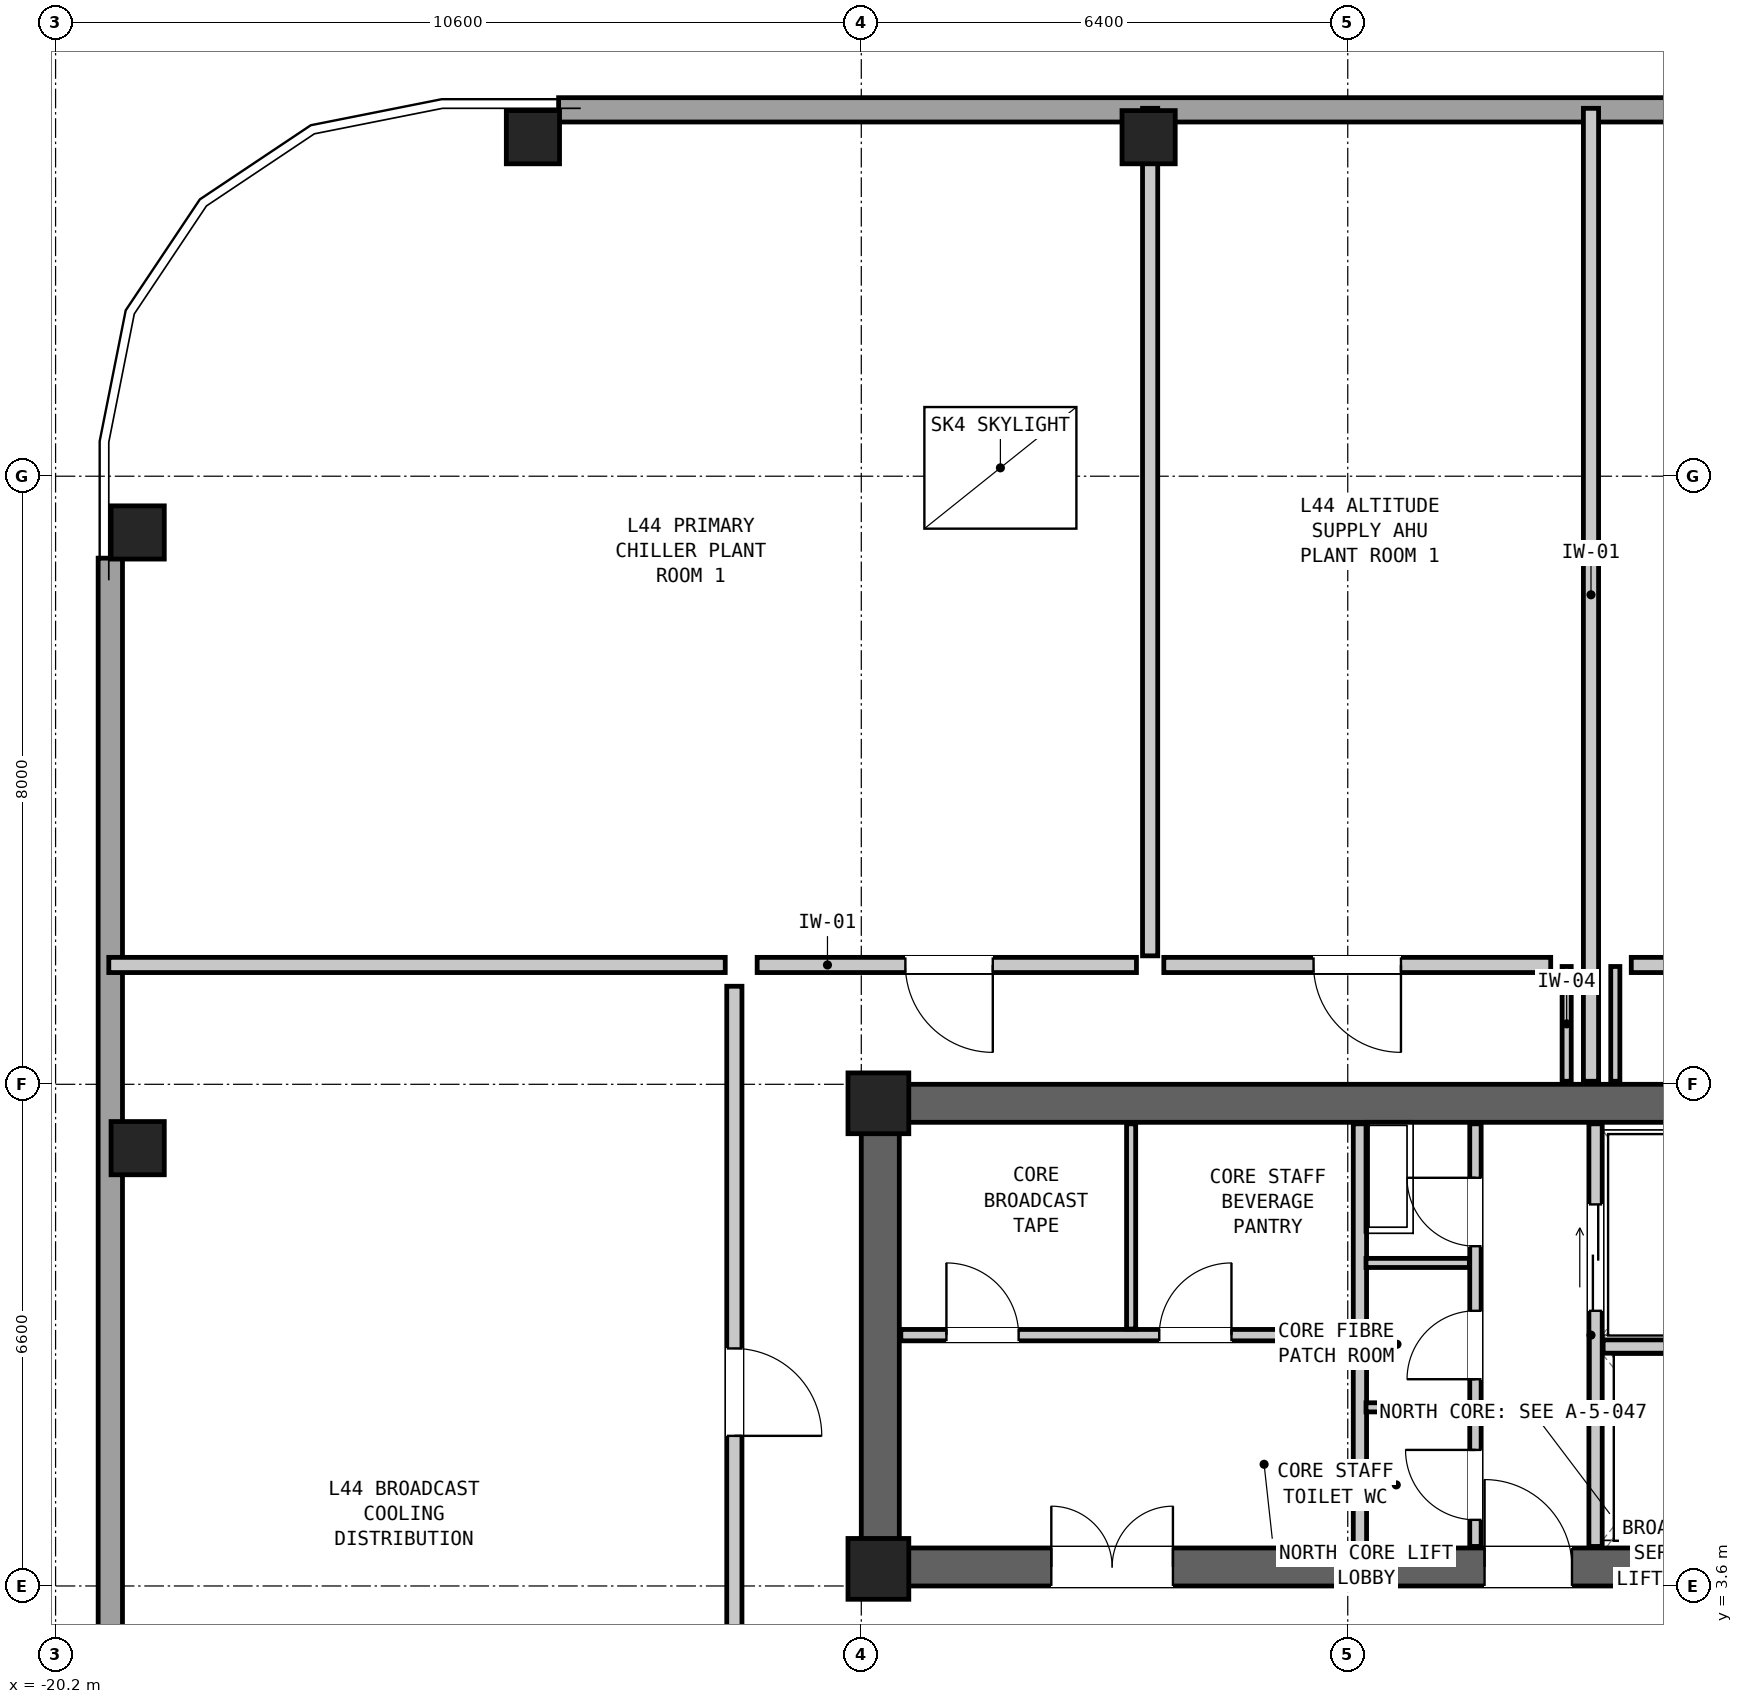
"""IFC4 building model, lengths in metres.
Left out: names, types, materials, properties, quantities, classifications, styles, units other than length and angle.
Written with IfcOpenShell. Run it as: python <this file> out.ifc"""

import sys

from ifc_helpers import new_model, si_unit, direction, frame, frame_2d, origin, origin_2d, place, context, subcontext, project, spatial, rectangle, hollow_rectangle, extrude, element, fill, save


model = new_model("IFC4")
c1 = context("Model", 3, precision=1e-05, world=origin(), true_north=direction((0.0, 1.0)))
c2 = subcontext(c1, "Body", "Model", "MODEL_VIEW")
j1 = project(units=[si_unit("LENGTHUNIT", "METRE"), si_unit("PLANEANGLEUNIT", "RADIAN")], contexts=[c1])
p1 = place(None, origin())
s1 = spatial("IfcSite", under=j1, at=p1, CompositionType="ELEMENT")
p2 = place(p1, origin())
s2 = spatial("IfcBuilding", under=s1, at=p2, CompositionType="ELEMENT")
p3 = place(p2, frame((0.0, 0.0, 151.8)))
s3 = spatial("IfcBuildingStorey", under=s2, at=p3, CompositionType="ELEMENT", Elevation=151.8)
p4 = place(p3, frame((-9.6, 9.95, 0.0), z_axis=(0.0, 0.0, 1.0), x_axis=(1.0, 0.0, 0.0)))
e1 = element("IfcWall", 1, at=p4, inside=s3, PredefinedType="SHEAR", context=c2, shape_type="SweptSolid", body=[
    extrude(rectangle(XDim=19.2, YDim=0.5, at=frame_2d((9.6, 0.0))), origin(), (0.0, 0.0, 1.0), 4.35),
])
p5 = place(p3, frame((-9.6, 3.85, 0.0), z_axis=(0.0, 0.0, 1.0), x_axis=(1.0, 0.0, 0.0)))
e2 = element("IfcWall", 2, at=p5, inside=s3, PredefinedType="SHEAR", context=c2, shape_type="SweptSolid", body=[
    extrude(rectangle(XDim=19.2, YDim=0.5, at=frame_2d((9.6, 0.0))), origin(), (0.0, 0.0, 1.0), 4.35),
])
p6 = place(p5, frame((14.2, 0.0, 0.0)))
e3 = element("IfcOpeningElement", 3, at=p6, cuts=e2, PredefinedType="OPENING", context=c2, shape_type="SweptSolid", body=[
    extrude(rectangle(XDim=1.1, YDim=2.08, at=frame_2d((0.55, 1.04))), frame((0.0, 0.262, 0.0), z_axis=(0.0, -1.0, 0.0), x_axis=(1.0, 0.0, 0.0)), (0.0, 0.0, 1.0), 0.524),
])
p7 = place(p5, frame((8.2, 0.0, 0.0)))
e4 = element("IfcOpeningElement", 4, at=p7, cuts=e2, PredefinedType="OPENING", context=c2, shape_type="SweptSolid", body=[
    extrude(rectangle(XDim=1.15, YDim=2.1, at=frame_2d((0.575, 1.05))), frame((0.0, 0.262, 0.0), z_axis=(0.0, -1.0, 0.0), x_axis=(1.0, 0.0, 0.0)), (0.0, 0.0, 1.0), 0.524),
])
p8 = place(p5, frame((2.5, 0.0, 0.0)))
e5 = element("IfcOpeningElement", 5, at=p8, cuts=e2, PredefinedType="OPENING", context=c2, shape_type="SweptSolid", body=[
    extrude(rectangle(XDim=1.6, YDim=2.12, at=frame_2d((0.8, 1.06))), frame((0.0, 0.262, 0.0), z_axis=(0.0, -1.0, 0.0), x_axis=(1.0, 0.0, 0.0)), (0.0, 0.0, 1.0), 0.524),
])
p9 = place(p3, frame((-9.35, 3.6, 0.0), z_axis=(0.0, 0.0, 1.0), x_axis=(0.0, 1.0, 0.0)))
e6 = element("IfcWall", 6, at=p9, inside=s3, PredefinedType="SHEAR", context=c2, shape_type="SweptSolid", body=[
    extrude(rectangle(XDim=6.6, YDim=0.5, at=frame_2d((3.3, 0.0))), origin(), (0.0, 0.0, 1.0), 4.35),
])
for number, where, z_axis, x_axis in (
    (7, (-5.82, 22.66, 0.0), (0.0, 0.0, 1.0), (1.0, 0.0, 0.0)),
    (8, (-13.92, 22.66, 0.0), (0.0, 0.0, 1.0), (1.0, 0.0, 0.0)),
    (9, (-19.12, 17.46, 0.0), (0.0, 0.0, 1.0), (0.0, 1.0, 0.0)),
    (10, (-19.12, 9.36, 0.0), (0.0, 0.0, 1.0), (0.0, 1.0, 0.0)),
):
    element("IfcColumn", number, at=place(p3, frame(where, z_axis=z_axis, x_axis=x_axis)), inside=s3, PredefinedType="COLUMN", context=c2, shape_type="SweptSolid", body=[
        extrude(hollow_rectangle(XDim=0.7, YDim=0.7, WallThickness=0.045, at=origin_2d()), origin(), (0.0, 0.0, 1.0), 4.35),
    ])
for number, where, z_axis, x_axis in (
    (11, (-9.375, 9.95, 0.0), (0.0, 0.0, 1.0), (1.0, 0.0, 0.0)),
    (12, (-9.375, 3.825, 0.0), (0.0, 0.0, 1.0), (1.0, 0.0, 0.0)),
):
    element("IfcColumn", number, at=place(p3, frame(where, z_axis=z_axis, x_axis=x_axis)), inside=s3, PredefinedType="COLUMN", context=c2, shape_type="SweptSolid", body=[
        extrude(rectangle(XDim=0.8, YDim=0.8, at=origin_2d()), origin(), (0.0, 0.0, 1.0), 4.35),
    ])
p10 = place(p3, frame((-13.582, 23.02, 0.0), z_axis=(0.0, 0.0, 1.0), x_axis=(1.0, 0.0, 0.0)))
e13 = element("IfcWall", 13, at=p10, inside=s3, PredefinedType="SOLIDWALL", context=c2, shape_type="SweptSolid", body=[
    extrude(rectangle(XDim=23.624, YDim=0.32, at=frame_2d((11.812, 0.0))), origin(), (0.0, 0.0, 1.0), 2.11),
])
p11 = place(p3, frame((-19.48, -6.502, 0.0), z_axis=(0.0, 0.0, 1.0), x_axis=(0.0, 1.0, 0.0)))
e14 = element("IfcWall", 14, at=p11, inside=s3, PredefinedType="SOLIDWALL", context=c2, shape_type="SweptSolid", body=[
    extrude(rectangle(XDim=23.624, YDim=0.32, at=frame_2d((11.812, 0.0))), origin(), (0.0, 0.0, 1.0), 2.31),
])
p12 = place(p3, frame((0.06, 4.12, 0.0), z_axis=(0.0, 0.0, 1.0), x_axis=(0.0, 1.0, 0.0)))
e15 = element("IfcWall", 15, at=p12, inside=s3, PredefinedType="PARTITIONING", context=c2, shape_type="SweptSolid", body=[
    extrude(rectangle(XDim=5.56, YDim=0.175, at=frame_2d((2.78, 0.0))), origin(), (0.0, 0.0, 1.0), 4.13),
])
p13 = place(p12, frame((3.1, 0.0, 0.0)))
e16 = element("IfcOpeningElement", 16, at=p13, cuts=e15, PredefinedType="OPENING", context=c2, shape_type="SweptSolid", body=[
    extrude(rectangle(XDim=1.4, YDim=2.12, at=frame_2d((0.7, 1.06))), frame((0.0, 0.1, 0.0), z_axis=(0.0, -1.0, 0.0), x_axis=(1.0, 0.0, 0.0)), (0.0, 0.0, 1.0), 0.199),
])
p14 = place(p3, frame((0.16, 6.75, 0.0), z_axis=(0.0, 0.0, 1.0), x_axis=(1.0, 0.0, 0.0)))
e17 = element("IfcWall", 17, at=p14, inside=s3, PredefinedType="PARTITIONING", context=c2, shape_type="SweptSolid", body=[
    extrude(rectangle(XDim=1.98, YDim=0.175, at=frame_2d((0.99, 0.0))), origin(), (0.0, 0.0, 1.0), 4.13),
])
p15 = place(p3, frame((-3.04, 4.12, 0.0), z_axis=(0.0, 0.0, 1.0), x_axis=(0.0, 1.0, 0.0)))
e18 = element("IfcWall", 18, at=p15, inside=s3, PredefinedType="PARTITIONING", context=c2, shape_type="SweptSolid", body=[
    extrude(rectangle(XDim=5.56, YDim=0.175, at=frame_2d((2.78, 0.0))), origin(), (0.0, 0.0, 1.0), 4.13),
])
p16 = place(p3, frame((-1.52, 4.12, 0.0), z_axis=(0.0, 0.0, 1.0), x_axis=(0.0, 1.0, 0.0)))
e19 = element("IfcWall", 19, at=p16, inside=s3, PredefinedType="PARTITIONING", context=c2, shape_type="SweptSolid", body=[
    extrude(rectangle(XDim=5.56, YDim=0.15, at=frame_2d((2.78, 0.0))), origin(), (0.0, 0.0, 1.0), 4.13),
])
p17 = place(p16, frame((3.95, 0.0, 0.0)))
e20 = element("IfcOpeningElement", 20, at=p17, cuts=e19, PredefinedType="OPENING", context=c2, shape_type="SweptSolid", body=[
    extrude(rectangle(XDim=0.9, YDim=2.05, at=frame_2d((0.45, 1.025))), frame((0.0, 0.087, 0.0), z_axis=(0.0, -1.0, 0.0), x_axis=(1.0, 0.0, 0.0)), (0.0, 0.0, 1.0), 0.174),
])
p18 = place(p16, frame((2.2, 0.0, 0.0)))
e21 = element("IfcOpeningElement", 21, at=p18, cuts=e19, PredefinedType="OPENING", context=c2, shape_type="SweptSolid", body=[
    extrude(rectangle(XDim=0.9, YDim=2.05, at=frame_2d((0.45, 1.025))), frame((0.0, 0.087, 0.0), z_axis=(0.0, -1.0, 0.0), x_axis=(1.0, 0.0, 0.0)), (0.0, 0.0, 1.0), 0.174),
])
p19 = place(p16, frame((0.35, 0.0, 0.0)))
e22 = element("IfcOpeningElement", 22, at=p19, cuts=e19, PredefinedType="OPENING", context=c2, shape_type="SweptSolid", body=[
    extrude(rectangle(XDim=0.92, YDim=2.1, at=frame_2d((0.46, 1.05))), frame((0.0, 0.087, 0.0), z_axis=(0.0, -1.0, 0.0), x_axis=(1.0, 0.0, 0.0)), (0.0, 0.0, 1.0), 0.174),
])
for number, where, z_axis, x_axis in (
    (23, (-2.96, 5.95, 0.0), (0.0, 0.0, 1.0), (1.0, 0.0, 0.0)),
    (24, (-2.96, 7.85, 0.0), (0.0, 0.0, 1.0), (1.0, 0.0, 0.0)),
):
    element("IfcWall", number, at=place(p3, frame(where, z_axis=z_axis, x_axis=x_axis)), inside=s3, PredefinedType="PARTITIONING", context=c2, shape_type="SweptSolid", body=[
        extrude(rectangle(XDim=1.36, YDim=0.12, at=frame_2d((0.68, 0.0))), origin(), (0.0, 0.0, 1.0), 4.13),
    ])
p20 = place(p3, frame((-9.08, 6.9, 0.0), z_axis=(0.0, 0.0, 1.0), x_axis=(1.0, 0.0, 0.0)))
e25 = element("IfcWall", 25, at=p20, inside=s3, PredefinedType="PARTITIONING", context=c2, shape_type="SweptSolid", body=[
    extrude(rectangle(XDim=5.96, YDim=0.15, at=frame_2d((2.98, 0.0))), origin(), (0.0, 0.0, 1.0), 4.13),
])
p21 = place(p20, frame((0.6, 0.0, 0.0)))
e26 = element("IfcOpeningElement", 26, at=p21, cuts=e25, PredefinedType="OPENING", context=c2, shape_type="SweptSolid", body=[
    extrude(rectangle(XDim=0.95, YDim=2.1, at=frame_2d((0.475, 1.05))), frame((0.0, 0.087, 0.0), z_axis=(0.0, -1.0, 0.0), x_axis=(1.0, 0.0, 0.0)), (0.0, 0.0, 1.0), 0.174),
])
p22 = place(p20, frame((3.4, 0.0, 0.0)))
e27 = element("IfcOpeningElement", 27, at=p22, cuts=e25, PredefinedType="OPENING", context=c2, shape_type="SweptSolid", body=[
    extrude(rectangle(XDim=0.95, YDim=2.1, at=frame_2d((0.475, 1.05))), frame((0.0, 0.087, 0.0), z_axis=(0.0, -1.0, 0.0), x_axis=(1.0, 0.0, 0.0)), (0.0, 0.0, 1.0), 0.174),
])
p23 = place(p3, frame((-6.05, 6.98, 0.0), z_axis=(0.0, 0.0, 1.0), x_axis=(0.0, 1.0, 0.0)))
e28 = element("IfcWall", 28, at=p23, inside=s3, PredefinedType="PARTITIONING", context=c2, shape_type="SweptSolid", body=[
    extrude(rectangle(XDim=2.7, YDim=0.12, at=frame_2d((1.35, 0.0))), origin(), (0.0, 0.0, 1.0), 4.13),
])
p24 = place(p3, frame((0.0, 10.24, 0.0), z_axis=(0.0, 0.0, 1.0), x_axis=(0.0, 1.0, 0.0)))
e29 = element("IfcWall", 29, at=p24, inside=s3, PredefinedType="PARTITIONING", context=c2, shape_type="SweptSolid", body=[
    extrude(rectangle(XDim=12.8, YDim=0.2, at=frame_2d((6.4, 0.0))), origin(), (0.0, 0.0, 1.0), 2.31),
])
for number, where, z_axis, x_axis in (
    (30, (-0.32, 10.24, 0.0), (0.0, 0.0, 1.0), (0.0, 1.0, 0.0)),
    (31, (0.32, 10.24, 0.0), (0.0, 0.0, 1.0), (0.0, 1.0, 0.0)),
):
    element("IfcWall", number, at=place(p3, frame(where, z_axis=z_axis, x_axis=x_axis)), inside=s3, PredefinedType="PARTITIONING", context=c2, shape_type="SweptSolid", body=[
        extrude(rectangle(XDim=1.51, YDim=0.12, at=frame_2d((0.755, 0.0))), origin(), (0.0, 0.0, 1.0), 2.31),
    ])
p25 = place(p3, frame((-5.98, 11.77, 0.0), z_axis=(0.0, 0.0, 1.0), x_axis=(-1.0, 0.0, 0.0)))
e32 = element("IfcWall", 32, at=p25, inside=s3, PredefinedType="PARTITIONING", context=c2, shape_type="SweptSolid", body=[
    extrude(rectangle(XDim=4.99, YDim=0.2, at=frame_2d((2.495, 0.0))), origin(), (0.0, 0.0, 1.0), 4.13),
])
p26 = place(p25, frame((1.89, 0.0, 0.0)))
e33 = element("IfcOpeningElement", 33, at=p26, cuts=e32, PredefinedType="OPENING", context=c2, shape_type="SweptSolid", body=[
    extrude(rectangle(XDim=1.15, YDim=2.1, at=frame_2d((0.575, 1.05))), frame((0.0, 0.112, 0.0), z_axis=(0.0, -1.0, 0.0), x_axis=(1.0, 0.0, 0.0)), (0.0, 0.0, 1.0), 0.224),
])
p27 = place(p3, frame((-5.8, 11.89, 0.0), z_axis=(0.0, 0.0, 1.0), x_axis=(0.0, 1.0, 0.0)))
e34 = element("IfcWall", 34, at=p27, inside=s3, PredefinedType="PARTITIONING", context=c2, shape_type="SweptSolid", body=[
    extrude(rectangle(XDim=11.15, YDim=0.2, at=frame_2d((5.575, 0.0))), origin(), (0.0, 0.0, 1.0), 3.647),
])
p28 = place(p3, frame((-0.53, 11.77, 0.0), z_axis=(0.0, 0.0, 1.0), x_axis=(-1.0, 0.0, 0.0)))
e35 = element("IfcWall", 35, at=p28, inside=s3, PredefinedType="PARTITIONING", context=c2, shape_type="SweptSolid", body=[
    extrude(rectangle(XDim=5.09, YDim=0.2, at=frame_2d((2.545, 0.0))), origin(), (0.0, 0.0, 1.0), 4.13),
])
p29 = place(p28, frame((1.97, 0.0, 0.0)))
e36 = element("IfcOpeningElement", 36, at=p29, cuts=e35, PredefinedType="OPENING", context=c2, shape_type="SweptSolid", body=[
    extrude(rectangle(XDim=1.15, YDim=2.1, at=frame_2d((0.575, 1.05))), frame((0.0, 0.112, 0.0), z_axis=(0.0, -1.0, 0.0), x_axis=(1.0, 0.0, 0.0)), (0.0, 0.0, 1.0), 0.224),
])
p30 = place(p3, frame((5.62, 11.77, 0.0), z_axis=(0.0, 0.0, 1.0), x_axis=(-1.0, 0.0, 0.0)))
e37 = element("IfcWall", 37, at=p30, inside=s3, PredefinedType="PARTITIONING", context=c2, shape_type="SweptSolid", body=[
    extrude(rectangle(XDim=5.09, YDim=0.2, at=frame_2d((2.545, 0.0))), origin(), (0.0, 0.0, 1.0), 4.13),
])
p31 = place(p30, frame((1.97, 0.0, 0.0)))
e38 = element("IfcOpeningElement", 38, at=p31, cuts=e37, PredefinedType="OPENING", context=c2, shape_type="SweptSolid", body=[
    extrude(rectangle(XDim=1.15, YDim=2.1, at=frame_2d((0.575, 1.05))), frame((0.0, 0.112, 0.0), z_axis=(0.0, -1.0, 0.0), x_axis=(1.0, 0.0, 0.0)), (0.0, 0.0, 1.0), 0.224),
])
p32 = place(p3, frame((-19.5, 11.77, 0.0), z_axis=(0.0, 0.0, 1.0), x_axis=(1.0, 0.0, 0.0)))
e39 = element("IfcWall", 39, at=p32, inside=s3, PredefinedType="PARTITIONING", context=c2, shape_type="SweptSolid", body=[
    extrude(rectangle(XDim=8.11, YDim=0.2, at=frame_2d((4.055, 0.0))), origin(), (0.0, 0.0, 1.0), 4.13),
])
p33 = place(p3, frame((-11.27, 11.49, 0.0), z_axis=(0.0, 0.0, 1.0), x_axis=(0.0, -1.0, 0.0)))
e40 = element("IfcWall", 40, at=p33, inside=s3, PredefinedType="PARTITIONING", context=c2, shape_type="SweptSolid", body=[
    extrude(rectangle(XDim=10.68, YDim=0.2, at=frame_2d((5.34, 0.0))), origin(), (0.0, 0.0, 1.0), 4.13),
])
p34 = place(p33, frame((4.765, 0.0, 0.0)))
e41 = element("IfcOpeningElement", 41, at=p34, cuts=e40, PredefinedType="OPENING", context=c2, shape_type="SweptSolid", body=[
    extrude(rectangle(XDim=1.15, YDim=2.1, at=frame_2d((0.575, 1.05))), frame((0.0, 0.112, 0.0), z_axis=(0.0, -1.0, 0.0), x_axis=(1.0, 0.0, 0.0)), (0.0, 0.0, 1.0), 0.224),
])
p35 = place(p3, frame((0.0, 0.0, -0.38)))
p36 = place(p35, frame((-7.77, 18.31, 0.0), z_axis=(0.0, 0.0, 1.0), x_axis=(1.0, 0.0, 0.0)))
p37 = place(p36, frame((0.0, 0.0, 0.33)))
e42 = element("IfcWindow", 42, at=p37, inside=s3, PartitioningType="SINGLE_PANEL", PredefinedType="SKYLIGHT", context=c2, shape_type="SweptSolid", body=[
    extrude(rectangle(XDim=2.0, YDim=1.6, at=origin_2d()), origin(), (0.0, 0.0, 1.0), 0.05),
])
p38 = place(p13, origin())
e43 = element("IfcDoor", 43, at=p38, inside=s3, OperationType="DOUBLE_DOOR_SLIDING", PredefinedType="DOOR", context=c2, shape_type="SweptSolid", body=[
    extrude(rectangle(XDim=1.4, YDim=2.12, at=frame_2d((0.7, 1.06))), frame((0.0, 0.025, 0.0), z_axis=(0.0, -1.0, 0.0), x_axis=(1.0, 0.0, 0.0)), (0.0, 0.0, 1.0), 0.05),
])
fill(e16, e43)
p39 = place(p7, origin())
e44 = element("IfcDoor", 44, at=p39, inside=s3, OperationType="SINGLE_SWING_LEFT", PredefinedType="DOOR", context=c2, shape_type="SweptSolid", body=[
    extrude(rectangle(XDim=1.15, YDim=2.1, at=frame_2d((0.575, 1.05))), frame((0.0, 0.025, 0.0), z_axis=(0.0, -1.0, 0.0), x_axis=(1.0, 0.0, 0.0)), (0.0, 0.0, 1.0), 0.05),
])
fill(e4, e44)
p40 = place(p17, origin())
e45 = element("IfcDoor", 45, at=p40, inside=s3, OperationType="SINGLE_SWING_RIGHT", PredefinedType="DOOR", context=c2, shape_type="SweptSolid", body=[
    extrude(rectangle(XDim=0.9, YDim=2.05, at=frame_2d((0.45, 1.025))), frame((0.0, 0.025, 0.0), z_axis=(0.0, -1.0, 0.0), x_axis=(1.0, 0.0, 0.0)), (0.0, 0.0, 1.0), 0.05),
])
fill(e20, e45)
p41 = place(p18, origin())
e46 = element("IfcDoor", 46, at=p41, inside=s3, OperationType="SINGLE_SWING_LEFT", PredefinedType="DOOR", context=c2, shape_type="SweptSolid", body=[
    extrude(rectangle(XDim=0.9, YDim=2.05, at=frame_2d((0.45, 1.025))), frame((0.0, 0.025, 0.0), z_axis=(0.0, -1.0, 0.0), x_axis=(1.0, 0.0, 0.0)), (0.0, 0.0, 1.0), 0.05),
])
fill(e21, e46)
p42 = place(p19, origin())
e47 = element("IfcDoor", 47, at=p42, inside=s3, OperationType="SINGLE_SWING_RIGHT", PredefinedType="DOOR", context=c2, shape_type="SweptSolid", body=[
    extrude(rectangle(XDim=0.92, YDim=2.1, at=frame_2d((0.46, 1.05))), frame((0.0, 0.025, 0.0), z_axis=(0.0, -1.0, 0.0), x_axis=(1.0, 0.0, 0.0)), (0.0, 0.0, 1.0), 0.05),
])
fill(e22, e47)
p43 = place(p8, origin())
e48 = element("IfcDoor", 48, at=p43, inside=s3, OperationType="DOUBLE_DOOR_SINGLE_SWING", PredefinedType="DOOR", context=c2, shape_type="SweptSolid", body=[
    extrude(rectangle(XDim=1.6, YDim=2.12, at=frame_2d((0.8, 1.06))), frame((0.0, 0.025, 0.0), z_axis=(0.0, -1.0, 0.0), x_axis=(1.0, 0.0, 0.0)), (0.0, 0.0, 1.0), 0.05),
])
fill(e5, e48)
p44 = place(p21, origin())
e49 = element("IfcDoor", 49, at=p44, inside=s3, OperationType="SINGLE_SWING_LEFT", PredefinedType="DOOR", context=c2, shape_type="SweptSolid", body=[
    extrude(rectangle(XDim=0.95, YDim=2.1, at=frame_2d((0.475, 1.05))), frame((0.0, 0.025, 0.0), z_axis=(0.0, -1.0, 0.0), x_axis=(1.0, 0.0, 0.0)), (0.0, 0.0, 1.0), 0.05),
])
fill(e26, e49)
p45 = place(p22, origin())
e50 = element("IfcDoor", 50, at=p45, inside=s3, OperationType="SINGLE_SWING_RIGHT", PredefinedType="DOOR", context=c2, shape_type="SweptSolid", body=[
    extrude(rectangle(XDim=0.95, YDim=2.1, at=frame_2d((0.475, 1.05))), frame((0.0, 0.025, 0.0), z_axis=(0.0, -1.0, 0.0), x_axis=(1.0, 0.0, 0.0)), (0.0, 0.0, 1.0), 0.05),
])
fill(e27, e50)
p46 = place(p26, origin())
e51 = element("IfcDoor", 51, at=p46, inside=s3, OperationType="SINGLE_SWING_LEFT", PredefinedType="DOOR", context=c2, shape_type="SweptSolid", body=[
    extrude(rectangle(XDim=1.15, YDim=2.1, at=frame_2d((0.575, 1.05))), frame((0.0, 0.025, 0.0), z_axis=(0.0, -1.0, 0.0), x_axis=(1.0, 0.0, 0.0)), (0.0, 0.0, 1.0), 0.05),
])
fill(e33, e51)
p47 = place(p29, origin())
e52 = element("IfcDoor", 52, at=p47, inside=s3, OperationType="SINGLE_SWING_LEFT", PredefinedType="DOOR", context=c2, shape_type="SweptSolid", body=[
    extrude(rectangle(XDim=1.15, YDim=2.1, at=frame_2d((0.575, 1.05))), frame((0.0, 0.025, 0.0), z_axis=(0.0, -1.0, 0.0), x_axis=(1.0, 0.0, 0.0)), (0.0, 0.0, 1.0), 0.05),
])
fill(e36, e52)
p48 = place(p34, origin())
e53 = element("IfcDoor", 53, at=p48, inside=s3, OperationType="SINGLE_SWING_RIGHT", PredefinedType="DOOR", context=c2, shape_type="SweptSolid", body=[
    extrude(rectangle(XDim=1.15, YDim=2.1, at=frame_2d((0.575, 1.05))), frame((0.0, 0.025, 0.0), z_axis=(0.0, -1.0, 0.0), x_axis=(1.0, 0.0, 0.0)), (0.0, 0.0, 1.0), 0.05),
])
fill(e41, e53)
save(model, sys.argv[1])
